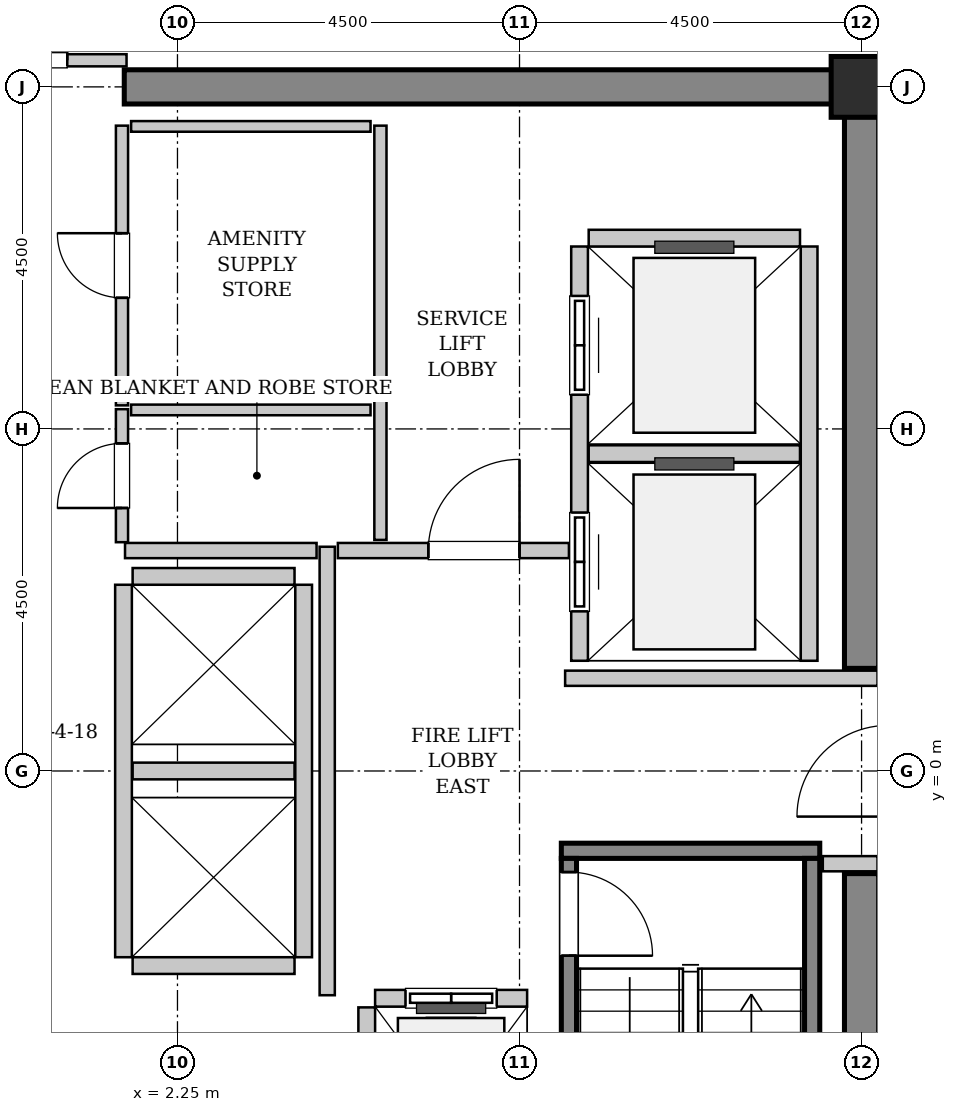
"""IFC4 building model, lengths in metres.
Left out: names, types, materials, properties, quantities, classifications, styles, units other than length and angle.
Written with IfcOpenShell. Run it as: python <this file> out.ifc"""

import sys

from ifc_helpers import new_model, si_unit, direction, frame, frame_2d, origin, origin_2d, place, context, subcontext, project, spatial, rectangle, hollow_rectangle, extrude, source, transform, mapped, element, fill, save


model = new_model("IFC4")
c1 = context("Model", 3, precision=1e-05, world=origin(), true_north=direction((0.0, 1.0)))
c2 = subcontext(c1, "Body", "Model", "MODEL_VIEW")
j1 = project(units=[si_unit("LENGTHUNIT", "METRE"), si_unit("PLANEANGLEUNIT", "RADIAN")], contexts=[c1])
p1 = place(None, origin())
s1 = spatial("IfcSite", under=j1, at=p1, CompositionType="ELEMENT")
p2 = place(p1, origin())
s2 = spatial("IfcBuilding", under=s1, at=p2, CompositionType="ELEMENT")
p3 = place(p2, frame((0.0, 0.0, 221.8)))
s3 = spatial("IfcBuildingStorey", under=s2, at=p3, CompositionType="ELEMENT", Elevation=221.8)
m1 = source(origin(), c2, "Body", "SweptSolid", [
    extrude(rectangle(XDim=9.925, YDim=0.45, at=frame_2d((4.962, 0.0))), origin(), (0.0, 0.0, 1.0), 3.8),
])
p4 = place(p3, frame((1.55, 9.0, 0.0), z_axis=(0.0, 0.0, 1.0), x_axis=(1.0, 0.0, 0.0)))
e1 = element("IfcWall", 1, at=p4, inside=s3, PredefinedType="SHEAR", context=c2, shape_type="MappedRepresentation", body=[
    mapped(m1, transform((0.0, 0.0, 0.0), x_axis=(1.0, 0.0, 0.0), y_axis=(0.0, 1.0, 0.0), z_axis=(0.0, 0.0, 1.0), scale=1.0)),
])
m2 = source(origin(), c2, "Body", "SweptSolid", [
    extrude(rectangle(XDim=7.425, YDim=0.45, at=frame_2d((3.712, 0.0))), origin(), (0.0, 0.0, 1.0), 3.8),
])
for number, where, z_axis, x_axis in (
    (2, (11.25, -8.775, 0.0), (0.0, 0.0, 1.0), (0.0, 1.0, 0.0)),
    (3, (11.25, 1.35, 0.0), (0.0, 0.0, 1.0), (0.0, 1.0, 0.0)),
):
    element("IfcWall", number, at=place(p3, frame(where, z_axis=z_axis, x_axis=x_axis)), inside=s3, PredefinedType="SHEAR", context=c2, shape_type="MappedRepresentation", body=[
        mapped(m2, transform((0.0, 0.0, 0.0), x_axis=(1.0, 0.0, 0.0), y_axis=(0.0, 1.0, 0.0), z_axis=(0.0, 0.0, 1.0), scale=1.0)),
    ])
m3 = source(origin(), c2, "Body", "SweptSolid", [
    extrude(hollow_rectangle(XDim=0.8, YDim=0.8, WallThickness=0.04, InnerFilletRadius=0.04, OuterFilletRadius=0.08, at=origin_2d()), origin(), (0.0, 0.0, 1.0), 3.8),
])
p5 = place(p3, frame((11.25, 9.0, 0.0), z_axis=(0.0, 0.0, 1.0), x_axis=(1.0, 0.0, 0.0)))
e4 = element("IfcColumn", 4, at=p5, inside=s3, PredefinedType="COLUMN", context=c2, shape_type="MappedRepresentation", body=[
    mapped(m3, transform((0.0, 0.0, 0.0), x_axis=(1.0, 0.0, 0.0), y_axis=(0.0, 1.0, 0.0), z_axis=(0.0, 0.0, 1.0), scale=1.0)),
])
m4 = source(origin(), c2, "Body", "SweptSolid", [
    extrude(rectangle(XDim=3.4, YDim=0.2, at=frame_2d((1.7, 0.0))), origin(), (0.0, 0.0, 1.0), 3.8),
])
p6 = place(p3, frame((7.3, -1.05, 0.0), z_axis=(0.0, 0.0, 1.0), x_axis=(1.0, 0.0, 0.0)))
e5 = element("IfcWall", 5, at=p6, inside=s3, PredefinedType="SOLIDWALL", context=c2, shape_type="MappedRepresentation", body=[
    mapped(m4, transform((0.0, 0.0, 0.0), x_axis=(1.0, 0.0, 0.0), y_axis=(0.0, 1.0, 0.0), z_axis=(0.0, 0.0, 1.0), scale=1.0)),
])
m5 = source(origin(), c2, "Body", "SweptSolid", [
    extrude(rectangle(XDim=7.1, YDim=0.2, at=frame_2d((3.55, 0.0))), origin(), (0.0, 0.0, 1.0), 3.8),
])
p7 = place(p3, frame((7.4, -1.15, 0.0), z_axis=(0.0, 0.0, 1.0), x_axis=(0.0, -1.0, 0.0)))
e6 = element("IfcWall", 6, at=p7, inside=s3, PredefinedType="SOLIDWALL", context=c2, shape_type="MappedRepresentation", body=[
    mapped(m5, transform((0.0, 0.0, 0.0), x_axis=(1.0, 0.0, 0.0), y_axis=(0.0, 1.0, 0.0), z_axis=(0.0, 0.0, 1.0), scale=1.0)),
])
p8 = place(p7, frame((0.18, 0.0, 0.0)))
e7 = element("IfcOpeningElement", 7, at=p8, cuts=e6, PredefinedType="OPENING", context=c2, shape_type="SweptSolid", body=[
    extrude(rectangle(XDim=1.1, YDim=2.15, at=frame_2d((0.55, 1.075))), frame((0.0, 0.11, 0.0), z_axis=(0.0, -1.0, 0.0), x_axis=(1.0, 0.0, 0.0)), (0.0, 0.0, 1.0), 0.22),
])
p9 = place(p3, frame((10.6, -1.15, 0.0), z_axis=(0.0, 0.0, 1.0), x_axis=(0.0, -1.0, 0.0)))
e8 = element("IfcWall", 8, at=p9, inside=s3, PredefinedType="SOLIDWALL", context=c2, shape_type="MappedRepresentation", body=[
    mapped(m5, transform((0.0, 0.0, 0.0), x_axis=(1.0, 0.0, 0.0), y_axis=(0.0, 1.0, 0.0), z_axis=(0.0, 0.0, 1.0), scale=1.0)),
])
m6 = source(origin(), c2, "Body", "SweptSolid", [
    extrude(rectangle(XDim=2.0, YDim=0.22, at=frame_2d((1.0, 0.0))), origin(), (0.0, 0.0, 1.0), 3.535),
])
p10 = place(p3, frame((6.85, -2.99, 0.0), z_axis=(0.0, 0.0, 1.0), x_axis=(-1.0, 0.0, 0.0)))
e9 = element("IfcWall", 9, at=p10, inside=s3, PredefinedType="SOLIDWALL", context=c2, shape_type="MappedRepresentation", body=[
    mapped(m6, transform((0.0, 0.0, 0.0), x_axis=(1.0, 0.0, 0.0), y_axis=(0.0, 1.0, 0.0), z_axis=(0.0, 0.0, 1.0), scale=1.0)),
])
p11 = place(p10, frame((0.4, 0.0, 0.0)))
e10 = element("IfcOpeningElement", 10, at=p11, cuts=e9, PredefinedType="OPENING", context=c2, shape_type="SweptSolid", body=[
    extrude(rectangle(XDim=1.2, YDim=2.2, at=frame_2d((0.6, 1.1))), frame((0.0, 0.12, 0.0), z_axis=(0.0, -1.0, 0.0), x_axis=(1.0, 0.0, 0.0)), (0.0, 0.0, 1.0), 0.24),
])
m7 = source(origin(), c2, "Body", "SweptSolid", [
    extrude(rectangle(XDim=2.68, YDim=0.22, at=frame_2d((1.34, 0.0))), origin(), (0.0, 0.0, 1.0), 3.535),
])
p12 = place(p3, frame((4.74, -3.11, 0.0), z_axis=(0.0, 0.0, 1.0), x_axis=(0.0, -1.0, 0.0)))
e11 = element("IfcWall", 11, at=p12, inside=s3, PredefinedType="SOLIDWALL", context=c2, shape_type="MappedRepresentation", body=[
    mapped(m7, transform((0.0, 0.0, 0.0), x_axis=(1.0, 0.0, 0.0), y_axis=(0.0, 1.0, 0.0), z_axis=(0.0, 0.0, 1.0), scale=1.0)),
])
m8 = source(origin(), c2, "Body", "SweptSolid", [
    extrude(rectangle(XDim=5.45, YDim=0.22, at=frame_2d((2.725, 0.0))), origin(), (0.0, 0.0, 1.0), 3.535),
])
p13 = place(p3, frame((7.54, 6.9, 0.0), z_axis=(0.0, 0.0, 1.0), x_axis=(0.0, -1.0, 0.0)))
e12 = element("IfcWall", 12, at=p13, inside=s3, PredefinedType="SOLIDWALL", context=c2, shape_type="MappedRepresentation", body=[
    mapped(m8, transform((0.0, 0.0, 0.0), x_axis=(1.0, 0.0, 0.0), y_axis=(0.0, 1.0, 0.0), z_axis=(0.0, 0.0, 1.0), scale=1.0)),
])
p14 = place(p13, frame((3.5, 0.0, 0.0)))
e13 = element("IfcOpeningElement", 13, at=p14, cuts=e12, PredefinedType="OPENING", context=c2, shape_type="SweptSolid", body=[
    extrude(rectangle(XDim=1.3, YDim=2.3, at=frame_2d((0.65, 1.15))), frame((0.0, 0.12, 0.0), z_axis=(0.0, -1.0, 0.0), x_axis=(1.0, 0.0, 0.0)), (0.0, 0.0, 1.0), 0.24),
])
p15 = place(p13, frame((0.65, 0.0, 0.0)))
e14 = element("IfcOpeningElement", 14, at=p15, cuts=e12, PredefinedType="OPENING", context=c2, shape_type="SweptSolid", body=[
    extrude(rectangle(XDim=1.3, YDim=2.3, at=frame_2d((0.65, 1.15))), frame((0.0, 0.12, 0.0), z_axis=(0.0, -1.0, 0.0), x_axis=(1.0, 0.0, 0.0)), (0.0, 0.0, 1.0), 0.24),
])
p16 = place(p3, frame((10.56, 1.45, 0.0), z_axis=(0.0, 0.0, 1.0), x_axis=(0.0, 1.0, 0.0)))
e15 = element("IfcWall", 15, at=p16, inside=s3, PredefinedType="SOLIDWALL", context=c2, shape_type="MappedRepresentation", body=[
    mapped(m8, transform((0.0, 0.0, 0.0), x_axis=(1.0, 0.0, 0.0), y_axis=(0.0, 1.0, 0.0), z_axis=(0.0, 0.0, 1.0), scale=1.0)),
])
m9 = source(origin(), c2, "Body", "SweptSolid", [
    extrude(rectangle(XDim=2.78, YDim=0.22, at=frame_2d((1.39, 0.0))), origin(), (0.0, 0.0, 1.0), 3.535),
])
for number, where, z_axis, x_axis in (
    (16, (7.66, 4.175, 0.0), (0.0, 0.0, 1.0), (1.0, 0.0, 0.0)),
    (17, (10.44, 7.01, 0.0), (0.0, 0.0, 1.0), (-1.0, 0.0, 0.0)),
):
    element("IfcWall", number, at=place(p3, frame(where, z_axis=z_axis, x_axis=x_axis)), inside=s3, PredefinedType="SOLIDWALL", context=c2, shape_type="MappedRepresentation", body=[
        mapped(m9, transform((0.0, 0.0, 0.0), x_axis=(1.0, 0.0, 0.0), y_axis=(0.0, 1.0, 0.0), z_axis=(0.0, 0.0, 1.0), scale=1.0)),
    ])
m10 = source(origin(), c2, "Body", "SweptSolid", [
    extrude(rectangle(XDim=4.9, YDim=0.22, at=frame_2d((2.45, 0.0))), origin(), (0.0, 0.0, 1.0), 3.535),
])
for number, where, z_axis, x_axis in (
    (18, (1.54, 2.45, 0.0), (0.0, 0.0, 1.0), (0.0, -1.0, 0.0)),
    (19, (3.91, -2.45, 0.0), (0.0, 0.0, 1.0), (0.0, 1.0, 0.0)),
):
    element("IfcWall", number, at=place(p3, frame(where, z_axis=z_axis, x_axis=x_axis)), inside=s3, PredefinedType="SOLIDWALL", context=c2, shape_type="MappedRepresentation", body=[
        mapped(m10, transform((0.0, 0.0, 0.0), x_axis=(1.0, 0.0, 0.0), y_axis=(0.0, 1.0, 0.0), z_axis=(0.0, 0.0, 1.0), scale=1.0)),
    ])
m11 = source(origin(), c2, "Body", "SweptSolid", [
    extrude(rectangle(XDim=2.13, YDim=0.22, at=frame_2d((1.065, 0.0))), origin(), (0.0, 0.0, 1.0), 3.535),
])
for number, where, z_axis, x_axis in (
    (20, (1.66, -2.56, 0.0), (0.0, 0.0, 1.0), (1.0, 0.0, 0.0)),
    (21, (1.66, 0.0, 0.0), (0.0, 0.0, 1.0), (1.0, 0.0, 0.0)),
    (22, (3.79, 2.56, 0.0), (0.0, 0.0, 1.0), (-1.0, 0.0, 0.0)),
):
    element("IfcWall", number, at=place(p3, frame(where, z_axis=z_axis, x_axis=x_axis)), inside=s3, PredefinedType="SOLIDWALL", context=c2, shape_type="MappedRepresentation", body=[
        mapped(m11, transform((0.0, 0.0, 0.0), x_axis=(1.0, 0.0, 0.0), y_axis=(0.0, 1.0, 0.0), z_axis=(0.0, 0.0, 1.0), scale=1.0)),
    ])
m12 = source(origin(), c2, "Body", "SweptSolid", [
    extrude(rectangle(XDim=5.9, YDim=0.2, at=frame_2d((2.95, 0.0))), origin(), (0.0, 0.0, 1.0), 3.535),
])
p17 = place(p3, frame((4.22, -2.95, 0.0), z_axis=(0.0, 0.0, 1.0), x_axis=(0.0, 1.0, 0.0)))
e23 = element("IfcWall", 23, at=p17, inside=s3, PredefinedType="PARTITIONING", context=c2, shape_type="MappedRepresentation", body=[
    mapped(m12, transform((0.0, 0.0, 0.0), x_axis=(1.0, 0.0, 0.0), y_axis=(0.0, 1.0, 0.0), z_axis=(0.0, 0.0, 1.0), scale=1.0)),
])
m13 = source(origin(), c2, "Body", "SweptSolid", [
    extrude(rectangle(XDim=2.52, YDim=0.2, at=frame_2d((1.26, 0.0))), origin(), (0.0, 0.0, 1.0), 3.535),
])
p18 = place(p3, frame((1.56, 2.9, 0.0), z_axis=(0.0, 0.0, 1.0), x_axis=(1.0, 0.0, 0.0)))
e24 = element("IfcWall", 24, at=p18, inside=s3, PredefinedType="PARTITIONING", context=c2, shape_type="MappedRepresentation", body=[
    mapped(m13, transform((0.0, 0.0, 0.0), x_axis=(1.0, 0.0, 0.0), y_axis=(0.0, 1.0, 0.0), z_axis=(0.0, 0.0, 1.0), scale=1.0)),
])
m14 = source(origin(), c2, "Body", "SweptSolid", [
    extrude(rectangle(XDim=3.04, YDim=0.2, at=frame_2d((1.52, 0.0))), origin(), (0.0, 0.0, 1.0), 3.535),
])
p19 = place(p3, frame((4.36, 2.9, 0.0), z_axis=(0.0, 0.0, 1.0), x_axis=(1.0, 0.0, 0.0)))
e25 = element("IfcWall", 25, at=p19, inside=s3, PredefinedType="PARTITIONING", context=c2, shape_type="MappedRepresentation", body=[
    mapped(m14, transform((0.0, 0.0, 0.0), x_axis=(1.0, 0.0, 0.0), y_axis=(0.0, 1.0, 0.0), z_axis=(0.0, 0.0, 1.0), scale=1.0)),
])
p20 = place(p19, frame((1.19, 0.0, 0.0)))
e26 = element("IfcOpeningElement", 26, at=p20, cuts=e25, PredefinedType="OPENING", context=c2, shape_type="SweptSolid", body=[
    extrude(rectangle(XDim=1.2, YDim=2.15, at=frame_2d((0.6, 1.075))), frame((0.0, 0.11, 0.0), z_axis=(0.0, -1.0, 0.0), x_axis=(1.0, 0.0, 0.0)), (0.0, 0.0, 1.0), 0.22),
])
m15 = source(origin(), c2, "Body", "SweptSolid", [
    extrude(rectangle(XDim=4.11, YDim=0.2, at=frame_2d((2.055, 0.0))), origin(), (0.0, 0.0, 1.0), 3.535),
])
p21 = place(p3, frame((7.35, 1.22, 0.0), z_axis=(0.0, 0.0, 1.0), x_axis=(1.0, 0.0, 0.0)))
e27 = element("IfcWall", 27, at=p21, inside=s3, PredefinedType="PARTITIONING", context=c2, shape_type="MappedRepresentation", body=[
    mapped(m15, transform((0.0, 0.0, 0.0), x_axis=(1.0, 0.0, 0.0), y_axis=(0.0, 1.0, 0.0), z_axis=(0.0, 0.0, 1.0), scale=1.0)),
])
m16 = source(origin(), c2, "Body", "SweptSolid", [
    extrude(rectangle(XDim=0.72, YDim=0.2, at=frame_2d((0.36, 0.0))), origin(), (0.0, 0.0, 1.0), 3.535),
])
p22 = place(p3, frame((10.74, -1.22, 0.0), z_axis=(0.0, 0.0, 1.0), x_axis=(1.0, 0.0, 0.0)))
e28 = element("IfcWall", 28, at=p22, inside=s3, PredefinedType="PARTITIONING", context=c2, shape_type="MappedRepresentation", body=[
    mapped(m16, transform((0.0, 0.0, 0.0), x_axis=(1.0, 0.0, 0.0), y_axis=(0.0, 1.0, 0.0), z_axis=(0.0, 0.0, 1.0), scale=1.0)),
])
m17 = source(origin(), c2, "Body", "SweptSolid", [
    extrude(rectangle(XDim=3.16, YDim=0.16, at=frame_2d((1.58, 0.0))), origin(), (0.0, 0.0, 1.0), 2.625),
])
p23 = place(p3, frame((-1.58, 9.35, 0.0), z_axis=(0.0, 0.0, 1.0), x_axis=(1.0, 0.0, 0.0)))
e29 = element("IfcWall", 29, at=p23, inside=s3, PredefinedType="PARTITIONING", context=c2, shape_type="MappedRepresentation", body=[
    mapped(m17, transform((0.0, 0.0, 0.0), x_axis=(1.0, 0.0, 0.0), y_axis=(0.0, 1.0, 0.0), z_axis=(0.0, 0.0, 1.0), scale=1.0)),
])
p24 = place(p23, frame((0.78, 0.0, 0.0)))
e30 = element("IfcOpeningElement", 30, at=p24, cuts=e29, PredefinedType="OPENING", context=c2, shape_type="SweptSolid", body=[
    extrude(rectangle(XDim=1.6, YDim=2.3, at=frame_2d((0.8, 1.15))), frame((0.0, 0.09, 0.0), z_axis=(0.0, -1.0, 0.0), x_axis=(1.0, 0.0, 0.0)), (0.0, 0.0, 1.0), 0.18),
])
m18 = source(origin(), c2, "Body", "SweptSolid", [
    extrude(rectangle(XDim=5.45, YDim=0.16, at=frame_2d((2.725, 0.0))), origin(), (0.0, 0.0, 1.0), 3.535),
])
p25 = place(p3, frame((4.92, 3.04, 0.0), z_axis=(0.0, 0.0, 1.0), x_axis=(0.0, 1.0, 0.0)))
e31 = element("IfcWall", 31, at=p25, inside=s3, PredefinedType="PARTITIONING", context=c2, shape_type="MappedRepresentation", body=[
    mapped(m18, transform((0.0, 0.0, 0.0), x_axis=(1.0, 0.0, 0.0), y_axis=(0.0, 1.0, 0.0), z_axis=(0.0, 0.0, 1.0), scale=1.0)),
])
m19 = source(origin(), c2, "Body", "SweptSolid", [
    extrude(rectangle(XDim=1.75, YDim=0.16, at=frame_2d((0.875, 0.0))), origin(), (0.0, 0.0, 1.0), 3.535),
])
p26 = place(p3, frame((1.52, 3.01, 0.0), z_axis=(0.0, 0.0, 1.0), x_axis=(0.0, 1.0, 0.0)))
e32 = element("IfcWall", 32, at=p26, inside=s3, PredefinedType="PARTITIONING", context=c2, shape_type="MappedRepresentation", body=[
    mapped(m19, transform((0.0, 0.0, 0.0), x_axis=(1.0, 0.0, 0.0), y_axis=(0.0, 1.0, 0.0), z_axis=(0.0, 0.0, 1.0), scale=1.0)),
])
p27 = place(p26, frame((0.45, 0.0, 0.0)))
e33 = element("IfcOpeningElement", 33, at=p27, cuts=e32, PredefinedType="OPENING", context=c2, shape_type="SweptSolid", body=[
    extrude(rectangle(XDim=0.85, YDim=2.1, at=frame_2d((0.425, 1.05))), frame((0.0, 0.09, 0.0), z_axis=(0.0, -1.0, 0.0), x_axis=(1.0, 0.0, 0.0)), (0.0, 0.0, 1.0), 0.18),
])
m20 = source(origin(), c2, "Body", "SweptSolid", [
    extrude(rectangle(XDim=3.15, YDim=0.14, at=frame_2d((1.575, 0.0))), origin(), (0.0, 0.0, 1.0), 3.535),
])
p28 = place(p3, frame((1.64, 4.75, 0.0), z_axis=(0.0, 0.0, 1.0), x_axis=(1.0, 0.0, 0.0)))
e34 = element("IfcWall", 34, at=p28, inside=s3, PredefinedType="PARTITIONING", context=c2, shape_type="MappedRepresentation", body=[
    mapped(m20, transform((0.0, 0.0, 0.0), x_axis=(1.0, 0.0, 0.0), y_axis=(0.0, 1.0, 0.0), z_axis=(0.0, 0.0, 1.0), scale=1.0)),
])
m21 = source(origin(), c2, "Body", "SweptSolid", [
    extrude(rectangle(XDim=3.68, YDim=0.16, at=frame_2d((1.84, 0.0))), origin(), (0.0, 0.0, 1.0), 3.535),
])
p29 = place(p3, frame((1.52, 4.81, 0.0), z_axis=(0.0, 0.0, 1.0), x_axis=(0.0, 1.0, 0.0)))
e35 = element("IfcWall", 35, at=p29, inside=s3, PredefinedType="PARTITIONING", context=c2, shape_type="MappedRepresentation", body=[
    mapped(m21, transform((0.0, 0.0, 0.0), x_axis=(1.0, 0.0, 0.0), y_axis=(0.0, 1.0, 0.0), z_axis=(0.0, 0.0, 1.0), scale=1.0)),
])
p30 = place(p29, frame((1.415, 0.0, 0.0)))
e36 = element("IfcOpeningElement", 36, at=p30, cuts=e35, PredefinedType="OPENING", context=c2, shape_type="SweptSolid", body=[
    extrude(rectangle(XDim=0.85, YDim=2.1, at=frame_2d((0.425, 1.05))), frame((0.0, 0.09, 0.0), z_axis=(0.0, -1.0, 0.0), x_axis=(1.0, 0.0, 0.0)), (0.0, 0.0, 1.0), 0.18),
])
p31 = place(p3, frame((1.64, 8.48, 0.0), z_axis=(0.0, 0.0, 1.0), x_axis=(1.0, 0.0, 0.0)))
e37 = element("IfcWall", 37, at=p31, inside=s3, PredefinedType="PARTITIONING", context=c2, shape_type="MappedRepresentation", body=[
    mapped(m20, transform((0.0, 0.0, 0.0), x_axis=(1.0, 0.0, 0.0), y_axis=(0.0, 1.0, 0.0), z_axis=(0.0, 0.0, 1.0), scale=1.0)),
])
m22 = source(origin(), c2, "Body", "SweptSolid", [
    extrude(rectangle(XDim=1.1, YDim=2.15, at=frame_2d((0.55, 1.075))), frame((0.0, 0.025, 0.0), z_axis=(0.0, -1.0, 0.0), x_axis=(1.0, 0.0, 0.0)), (0.0, 0.0, 1.0), 0.05),
])
p32 = place(p8, origin())
e38 = element("IfcDoor", 38, at=p32, inside=s3, OperationType="SINGLE_SWING_RIGHT", PredefinedType="DOOR", context=c2, shape_type="MappedRepresentation", body=[
    mapped(m22, transform((0.0, 0.0, 0.0), x_axis=(1.0, 0.0, 0.0), y_axis=(0.0, 1.0, 0.0), z_axis=(0.0, 0.0, 1.0), scale=1.0)),
])
fill(e7, e38)
m23 = source(origin(), c2, "Body", "SweptSolid", [
    extrude(rectangle(XDim=1.2, YDim=2.2, at=frame_2d((0.6, 1.1))), frame((0.0, 0.025, 0.0), z_axis=(0.0, -1.0, 0.0), x_axis=(1.0, 0.0, 0.0)), (0.0, 0.0, 1.0), 0.05),
])
p33 = place(p11, origin())
e39 = element("IfcDoor", 39, at=p33, inside=s3, OperationType="SLIDING_TO_LEFT", PredefinedType="DOOR", context=c2, shape_type="MappedRepresentation", body=[
    mapped(m23, transform((0.0, 0.0, 0.0), x_axis=(1.0, 0.0, 0.0), y_axis=(0.0, 1.0, 0.0), z_axis=(0.0, 0.0, 1.0), scale=1.0)),
])
fill(e10, e39)
m24 = source(origin(), c2, "Body", "SweptSolid", [
    extrude(rectangle(XDim=1.3, YDim=2.3, at=frame_2d((0.65, 1.15))), frame((0.0, 0.025, 0.0), z_axis=(0.0, -1.0, 0.0), x_axis=(1.0, 0.0, 0.0)), (0.0, 0.0, 1.0), 0.05),
])
p34 = place(p14, origin())
e40 = element("IfcDoor", 40, at=p34, inside=s3, OperationType="SLIDING_TO_RIGHT", PredefinedType="DOOR", context=c2, shape_type="MappedRepresentation", body=[
    mapped(m24, transform((0.0, 0.0, 0.0), x_axis=(1.0, 0.0, 0.0), y_axis=(0.0, 1.0, 0.0), z_axis=(0.0, 0.0, 1.0), scale=1.0)),
])
fill(e13, e40)
p35 = place(p15, origin())
e41 = element("IfcDoor", 41, at=p35, inside=s3, OperationType="SLIDING_TO_RIGHT", PredefinedType="DOOR", context=c2, shape_type="MappedRepresentation", body=[
    mapped(m24, transform((0.0, 0.0, 0.0), x_axis=(1.0, 0.0, 0.0), y_axis=(0.0, 1.0, 0.0), z_axis=(0.0, 0.0, 1.0), scale=1.0)),
])
fill(e14, e41)
m25 = source(origin(), c2, "Body", "SweptSolid", [
    extrude(rectangle(XDim=1.2, YDim=2.15, at=frame_2d((0.6, 1.075))), frame((0.0, 0.025, 0.0), z_axis=(0.0, -1.0, 0.0), x_axis=(1.0, 0.0, 0.0)), (0.0, 0.0, 1.0), 0.05),
])
p36 = place(p20, origin())
e42 = element("IfcDoor", 42, at=p36, inside=s3, OperationType="SINGLE_SWING_RIGHT", PredefinedType="DOOR", context=c2, shape_type="MappedRepresentation", body=[
    mapped(m25, transform((0.0, 0.0, 0.0), x_axis=(1.0, 0.0, 0.0), y_axis=(0.0, 1.0, 0.0), z_axis=(0.0, 0.0, 1.0), scale=1.0)),
])
fill(e26, e42)
m26 = source(origin(), c2, "Body", "SweptSolid", [
    extrude(rectangle(XDim=1.6, YDim=2.3, at=frame_2d((0.8, 1.15))), frame((0.0, 0.025, 0.0), z_axis=(0.0, -1.0, 0.0), x_axis=(1.0, 0.0, 0.0)), (0.0, 0.0, 1.0), 0.05),
])
p37 = place(p24, origin())
e43 = element("IfcDoor", 43, at=p37, inside=s3, OperationType="DOUBLE_DOOR_SINGLE_SWING", PredefinedType="DOOR", context=c2, shape_type="MappedRepresentation", body=[
    mapped(m26, transform((0.0, 0.0, 0.0), x_axis=(1.0, 0.0, 0.0), y_axis=(0.0, 1.0, 0.0), z_axis=(0.0, 0.0, 1.0), scale=1.0)),
])
fill(e30, e43)
m27 = source(origin(), c2, "Body", "SweptSolid", [
    extrude(rectangle(XDim=0.85, YDim=2.1, at=frame_2d((0.425, 1.05))), frame((0.0, 0.025, 0.0), z_axis=(0.0, -1.0, 0.0), x_axis=(1.0, 0.0, 0.0)), (0.0, 0.0, 1.0), 0.05),
])
p38 = place(p27, origin())
e44 = element("IfcDoor", 44, at=p38, inside=s3, OperationType="SINGLE_SWING_LEFT", PredefinedType="DOOR", context=c2, shape_type="MappedRepresentation", body=[
    mapped(m27, transform((0.0, 0.0, 0.0), x_axis=(1.0, 0.0, 0.0), y_axis=(0.0, 1.0, 0.0), z_axis=(0.0, 0.0, 1.0), scale=1.0)),
])
fill(e33, e44)
p39 = place(p30, origin())
e45 = element("IfcDoor", 45, at=p39, inside=s3, OperationType="SINGLE_SWING_RIGHT", PredefinedType="DOOR", context=c2, shape_type="MappedRepresentation", body=[
    mapped(m27, transform((0.0, 0.0, 0.0), x_axis=(1.0, 0.0, 0.0), y_axis=(0.0, 1.0, 0.0), z_axis=(0.0, 0.0, 1.0), scale=1.0)),
])
fill(e36, e45)
save(model, sys.argv[1])
